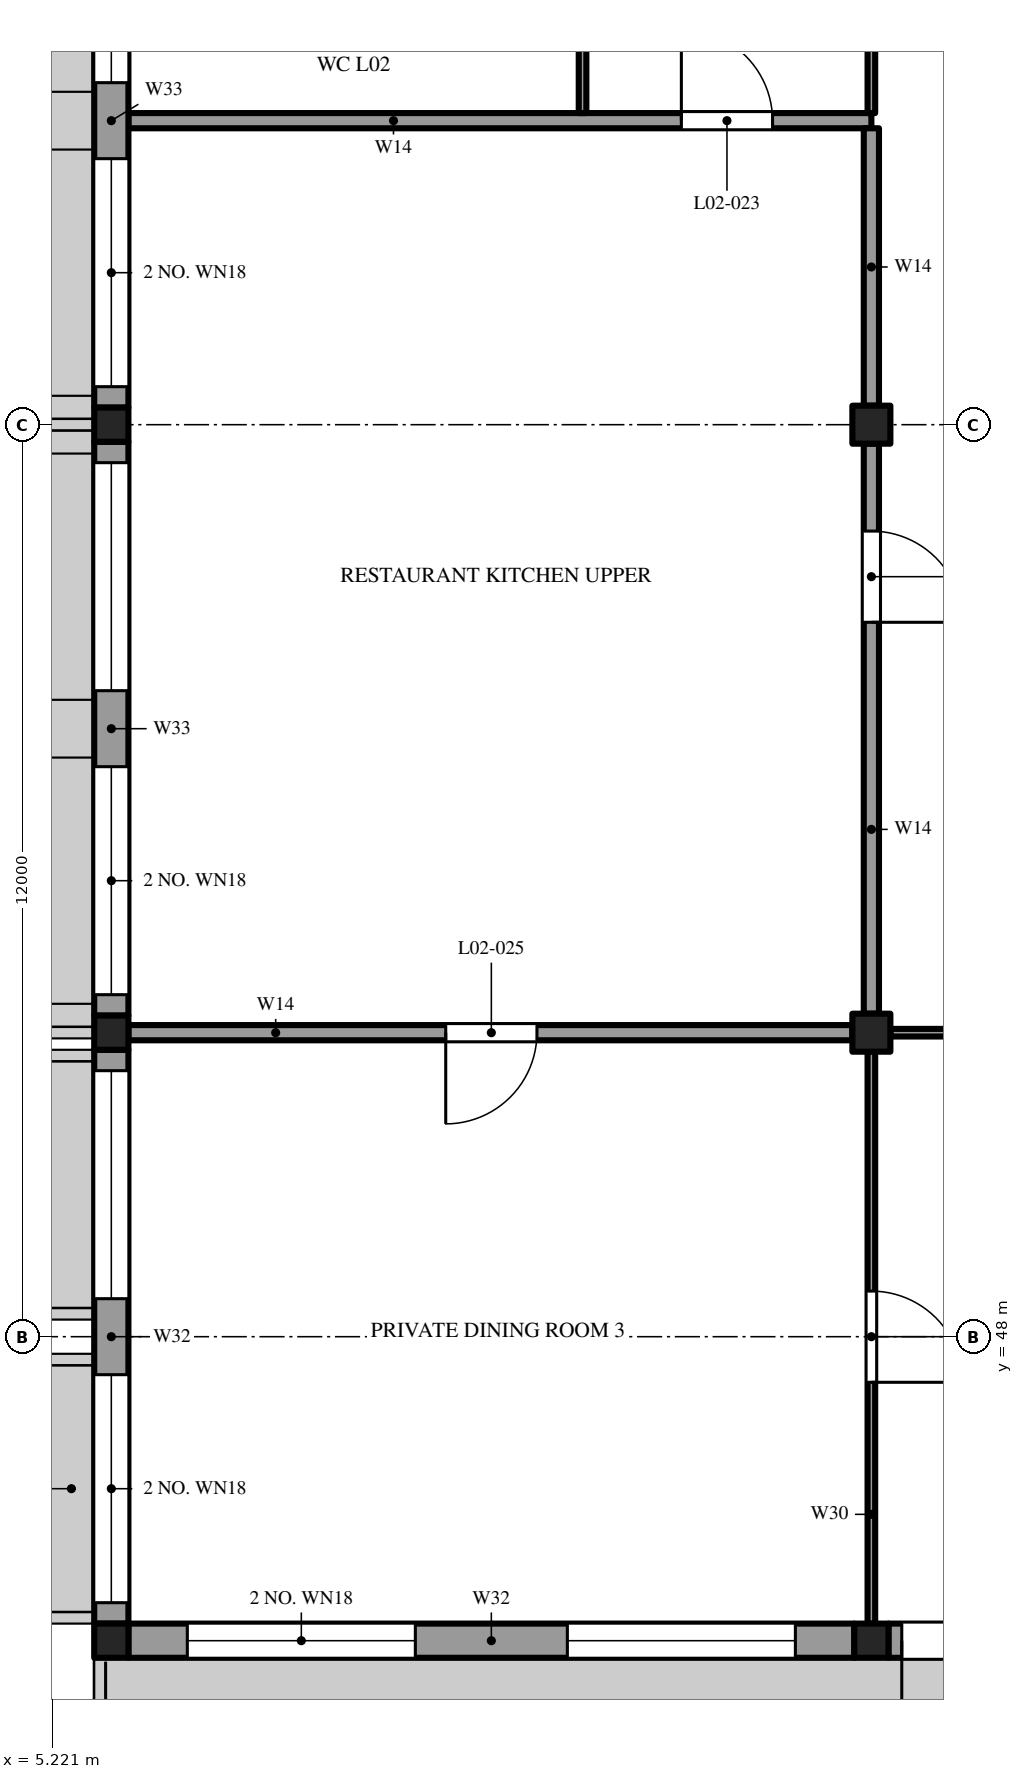
"""IFC4 building model, lengths in metres.
Left out: names, types, materials, properties, quantities, classifications, styles, units other than length and angle.
Written with IfcOpenShell. Run it as: python <this file> out.ifc"""

import sys

from ifc_helpers import new_model, si_unit, direction, frame, frame_2d, origin, origin_2d, place, context, subcontext, project, spatial, rectangle, extrude, element, fill, save


model = new_model("IFC4")
c1 = context("Model", 3, precision=1e-05, world=origin(), true_north=direction((0.0, 1.0)))
c2 = subcontext(c1, "Body", "Model", "MODEL_VIEW")
j1 = project(units=[si_unit("LENGTHUNIT", "METRE"), si_unit("PLANEANGLEUNIT", "RADIAN")], contexts=[c1])
p1 = place(None, origin())
s1 = spatial("IfcSite", under=j1, at=p1, CompositionType="ELEMENT")
p2 = place(p1, origin())
s2 = spatial("IfcBuilding", under=s1, at=p2, CompositionType="ELEMENT")
p3 = place(p2, frame((0.0, 0.0, 12.0)))
s3 = spatial("IfcBuildingStorey", under=s2, at=p3, CompositionType="ELEMENT", Elevation=12.0)
for number, where, z_axis, x_axis in (
    (1, (6.0, 44.0, 0.0), (0.0, 0.0, 1.0), (1.0, 0.0, 0.0)),
    (2, (6.0, 52.0, 0.0), (0.0, 0.0, 1.0), (1.0, 0.0, 0.0)),
    (3, (6.0, 60.0, 0.0), (0.0, 0.0, 1.0), (1.0, 0.0, 0.0)),
    (4, (16.0, 44.0, 0.0), (0.0, 0.0, 1.0), (1.0, 0.0, 0.0)),
):
    element("IfcColumn", number, at=place(p3, frame(where, z_axis=z_axis, x_axis=x_axis)), inside=s3, PredefinedType="COLUMN", context=c2, shape_type="SweptSolid", body=[
        extrude(rectangle(XDim=0.45, YDim=0.45, at=origin_2d()), origin(), (0.0, 0.0, 1.0), 4.8),
    ])
for number, where, z_axis, x_axis in (
    (5, (16.0, 52.0, 0.0), (0.0, 0.0, 1.0), (1.0, 0.0, 0.0)),
    (6, (16.0, 60.0, 0.0), (0.0, 0.0, 1.0), (1.0, 0.0, 0.0)),
):
    element("IfcColumn", number, at=place(p3, frame(where, z_axis=z_axis, x_axis=x_axis)), inside=s3, PredefinedType="COLUMN", context=c2, shape_type="SweptSolid", body=[
        extrude(rectangle(XDim=0.5, YDim=0.5, at=origin_2d()), origin(), (0.0, 0.0, 1.0), 4.8),
    ])
p4 = place(p3, frame((6.225, 44.0, 0.0), z_axis=(0.0, 0.0, 1.0), x_axis=(1.0, 0.0, 0.0)))
e7 = element("IfcWall", 7, at=p4, inside=s3, PredefinedType="SOLIDWALL", context=c2, shape_type="SweptSolid", body=[
    extrude(rectangle(XDim=9.55, YDim=0.45, at=frame_2d((4.775, 0.0))), origin(), (0.0, 0.0, 1.0), 4.45),
])
p5 = place(p4, frame((0.775, 0.0, 0.6)))
e8 = element("IfcOpeningElement", 8, at=p5, cuts=e7, PredefinedType="OPENING", context=c2, shape_type="SweptSolid", body=[
    extrude(rectangle(XDim=3.0, YDim=3.2, at=frame_2d((1.5, 1.6))), frame((0.0, 0.235, 0.0), z_axis=(0.0, -1.0, 0.0), x_axis=(1.0, 0.0, 0.0)), (0.0, 0.0, 1.0), 0.47),
])
p6 = place(p4, frame((5.775, 0.0, 0.6)))
e9 = element("IfcOpeningElement", 9, at=p6, cuts=e7, PredefinedType="OPENING", context=c2, shape_type="SweptSolid", body=[
    extrude(rectangle(XDim=3.0, YDim=3.2, at=frame_2d((1.5, 1.6))), frame((0.0, 0.235, 0.0), z_axis=(0.0, -1.0, 0.0), x_axis=(1.0, 0.0, 0.0)), (0.0, 0.0, 1.0), 0.47),
])
p7 = place(p3, frame((16.225, 44.0, 0.0), z_axis=(0.0, 0.0, 1.0), x_axis=(1.0, 0.0, 0.0)))
e10 = element("IfcWall", 10, at=p7, inside=s3, PredefinedType="SOLIDWALL", context=c2, shape_type="SweptSolid", body=[
    extrude(rectangle(XDim=9.55, YDim=0.45, at=frame_2d((4.775, 0.0))), origin(), (0.0, 0.0, 1.0), 4.45),
])
p8 = place(p7, frame((0.175, 0.0, 0.0)))
e11 = element("IfcOpeningElement", 11, at=p8, cuts=e10, PredefinedType="OPENING", context=c2, shape_type="SweptSolid", body=[
    extrude(rectangle(XDim=3.0, YDim=2.4, at=frame_2d((1.5, 1.2))), frame((0.0, 0.235, 0.0), z_axis=(0.0, -1.0, 0.0), x_axis=(1.0, 0.0, 0.0)), (0.0, 0.0, 1.0), 0.47),
])
p9 = place(p7, frame((3.475, 0.0, 0.0)))
e12 = element("IfcOpeningElement", 12, at=p9, cuts=e10, PredefinedType="OPENING", context=c2, shape_type="SweptSolid", body=[
    extrude(rectangle(XDim=3.0, YDim=2.4, at=frame_2d((1.5, 1.2))), frame((0.0, 0.235, 0.0), z_axis=(0.0, -1.0, 0.0), x_axis=(1.0, 0.0, 0.0)), (0.0, 0.0, 1.0), 0.47),
])
p10 = place(p3, frame((6.225, 52.0, 0.0), z_axis=(0.0, 0.0, 1.0), x_axis=(1.0, 0.0, 0.0)))
e13 = element("IfcWall", 13, at=p10, inside=s3, PredefinedType="SOLIDWALL", context=c2, shape_type="SweptSolid", body=[
    extrude(rectangle(XDim=9.525, YDim=0.2, at=frame_2d((4.762, 0.0))), origin(), (0.0, 0.0, 1.0), 4.45),
])
p11 = place(p10, frame((4.175, 0.0, 0.0)))
e14 = element("IfcOpeningElement", 14, at=p11, cuts=e13, PredefinedType="OPENING", context=c2, shape_type="SweptSolid", body=[
    extrude(rectangle(XDim=1.2, YDim=2.1, at=frame_2d((0.6, 1.05))), frame((0.0, 0.11, 0.0), z_axis=(0.0, -1.0, 0.0), x_axis=(1.0, 0.0, 0.0)), (0.0, 0.0, 1.0), 0.22),
])
p12 = place(p3, frame((16.25, 52.0, 0.0), z_axis=(0.0, 0.0, 1.0), x_axis=(1.0, 0.0, 0.0)))
e15 = element("IfcWall", 15, at=p12, inside=s3, PredefinedType="PARTITIONING", context=c2, shape_type="SweptSolid", body=[
    extrude(rectangle(XDim=9.5, YDim=0.1, at=frame_2d((4.75, 0.0))), origin(), (0.0, 0.0, 1.0), 4.45),
])
p13 = place(p12, frame((4.55, 0.0, 0.0)))
e16 = element("IfcOpeningElement", 16, at=p13, cuts=e15, PredefinedType="OPENING", context=c2, shape_type="SweptSolid", body=[
    extrude(rectangle(XDim=2.4, YDim=2.1, at=frame_2d((1.2, 1.05))), frame((0.0, 0.06, 0.0), z_axis=(0.0, -1.0, 0.0), x_axis=(1.0, 0.0, 0.0)), (0.0, 0.0, 1.0), 0.12),
])
p14 = place(p3, frame((6.225, 64.0, 0.0), z_axis=(0.0, 0.0, 1.0), x_axis=(1.0, 0.0, 0.0)))
e17 = element("IfcWall", 17, at=p14, inside=s3, PredefinedType="SOLIDWALL", context=c2, shape_type="SweptSolid", body=[
    extrude(rectangle(XDim=9.775, YDim=0.2, at=frame_2d((4.887, 0.0))), origin(), (0.0, 0.0, 1.0), 4.45),
])
p15 = place(p14, frame((7.275, 0.0, 0.0)))
e18 = element("IfcOpeningElement", 18, at=p15, cuts=e17, PredefinedType="OPENING", context=c2, shape_type="SweptSolid", body=[
    extrude(rectangle(XDim=1.2, YDim=2.1, at=frame_2d((0.6, 1.05))), frame((0.0, 0.11, 0.0), z_axis=(0.0, -1.0, 0.0), x_axis=(1.0, 0.0, 0.0)), (0.0, 0.0, 1.0), 0.22),
])
p16 = place(p3, frame((6.0, 51.775, 0.0), z_axis=(0.0, 0.0, 1.0), x_axis=(0.0, -1.0, 0.0)))
e19 = element("IfcWall", 19, at=p16, inside=s3, PredefinedType="SOLIDWALL", context=c2, shape_type="SweptSolid", body=[
    extrude(rectangle(XDim=7.55, YDim=0.45, at=frame_2d((3.775, 0.0))), origin(), (0.0, 0.0, 1.0), 4.45),
])
p17 = place(p16, frame((4.275, 0.0, 0.6)))
e20 = element("IfcOpeningElement", 20, at=p17, cuts=e19, PredefinedType="OPENING", context=c2, shape_type="SweptSolid", body=[
    extrude(rectangle(XDim=3.0, YDim=3.2, at=frame_2d((1.5, 1.6))), frame((0.0, 0.235, 0.0), z_axis=(0.0, -1.0, 0.0), x_axis=(1.0, 0.0, 0.0)), (0.0, 0.0, 1.0), 0.47),
])
p18 = place(p16, frame((0.275, 0.0, 0.6)))
e21 = element("IfcOpeningElement", 21, at=p18, cuts=e19, PredefinedType="OPENING", context=c2, shape_type="SweptSolid", body=[
    extrude(rectangle(XDim=3.0, YDim=3.2, at=frame_2d((1.5, 1.6))), frame((0.0, 0.235, 0.0), z_axis=(0.0, -1.0, 0.0), x_axis=(1.0, 0.0, 0.0)), (0.0, 0.0, 1.0), 0.47),
])
p19 = place(p3, frame((6.0, 59.775, 0.0), z_axis=(0.0, 0.0, 1.0), x_axis=(0.0, -1.0, 0.0)))
e22 = element("IfcWall", 22, at=p19, inside=s3, PredefinedType="SOLIDWALL", context=c2, shape_type="SweptSolid", body=[
    extrude(rectangle(XDim=7.55, YDim=0.45, at=frame_2d((3.775, 0.0))), origin(), (0.0, 0.0, 1.0), 4.45),
])
p20 = place(p19, frame((4.275, 0.0, 0.6)))
e23 = element("IfcOpeningElement", 23, at=p20, cuts=e22, PredefinedType="OPENING", context=c2, shape_type="SweptSolid", body=[
    extrude(rectangle(XDim=3.0, YDim=3.2, at=frame_2d((1.5, 1.6))), frame((0.0, 0.235, 0.0), z_axis=(0.0, -1.0, 0.0), x_axis=(1.0, 0.0, 0.0)), (0.0, 0.0, 1.0), 0.47),
])
p21 = place(p19, frame((0.275, 0.0, 0.6)))
e24 = element("IfcOpeningElement", 24, at=p21, cuts=e22, PredefinedType="OPENING", context=c2, shape_type="SweptSolid", body=[
    extrude(rectangle(XDim=3.0, YDim=3.2, at=frame_2d((1.5, 1.6))), frame((0.0, 0.235, 0.0), z_axis=(0.0, -1.0, 0.0), x_axis=(1.0, 0.0, 0.0)), (0.0, 0.0, 1.0), 0.47),
])
p22 = place(p3, frame((6.0, 67.775, 0.0), z_axis=(0.0, 0.0, 1.0), x_axis=(0.0, -1.0, 0.0)))
e25 = element("IfcWall", 25, at=p22, inside=s3, PredefinedType="SOLIDWALL", context=c2, shape_type="SweptSolid", body=[
    extrude(rectangle(XDim=7.55, YDim=0.45, at=frame_2d((3.775, 0.0))), origin(), (0.0, 0.0, 1.0), 4.45),
])
p23 = place(p22, frame((4.275, 0.0, 0.6)))
e26 = element("IfcOpeningElement", 26, at=p23, cuts=e25, PredefinedType="OPENING", context=c2, shape_type="SweptSolid", body=[
    extrude(rectangle(XDim=3.0, YDim=3.2, at=frame_2d((1.5, 1.6))), frame((0.0, 0.235, 0.0), z_axis=(0.0, -1.0, 0.0), x_axis=(1.0, 0.0, 0.0)), (0.0, 0.0, 1.0), 0.47),
])
p24 = place(p22, frame((0.275, 0.0, 0.6)))
e27 = element("IfcOpeningElement", 27, at=p24, cuts=e25, PredefinedType="OPENING", context=c2, shape_type="SweptSolid", body=[
    extrude(rectangle(XDim=3.0, YDim=3.2, at=frame_2d((1.5, 1.6))), frame((0.0, 0.235, 0.0), z_axis=(0.0, -1.0, 0.0), x_axis=(1.0, 0.0, 0.0)), (0.0, 0.0, 1.0), 0.47),
])
p25 = place(p3, frame((12.2, 64.1, 0.0), z_axis=(0.0, 0.0, 1.0), x_axis=(0.0, 1.0, 0.0)))
e28 = element("IfcWall", 28, at=p25, inside=s3, PredefinedType="PARTITIONING", context=c2, shape_type="SweptSolid", body=[
    extrude(rectangle(XDim=11.8, YDim=0.1, at=frame_2d((5.9, 0.0))), origin(), (0.0, 0.0, 1.0), 4.45),
])
p26 = place(p25, frame((1.35, 0.0, 0.0)))
e29 = element("IfcOpeningElement", 29, at=p26, cuts=e28, PredefinedType="OPENING", context=c2, shape_type="SweptSolid", body=[
    extrude(rectangle(XDim=1.1, YDim=2.1, at=frame_2d((0.55, 1.05))), frame((0.0, 0.06, 0.0), z_axis=(0.0, -1.0, 0.0), x_axis=(1.0, 0.0, 0.0)), (0.0, 0.0, 1.0), 0.12),
])
p27 = place(p25, frame((5.4, 0.0, 0.0)))
e30 = element("IfcOpeningElement", 30, at=p27, cuts=e28, PredefinedType="OPENING", context=c2, shape_type="SweptSolid", body=[
    extrude(rectangle(XDim=1.0, YDim=2.1, at=frame_2d((0.5, 1.05))), frame((0.0, 0.06, 0.0), z_axis=(0.0, -1.0, 0.0), x_axis=(1.0, 0.0, 0.0)), (0.0, 0.0, 1.0), 0.12),
])
p28 = place(p25, frame((9.4, 0.0, 0.0)))
e31 = element("IfcOpeningElement", 31, at=p28, cuts=e28, PredefinedType="OPENING", context=c2, shape_type="SweptSolid", body=[
    extrude(rectangle(XDim=1.0, YDim=2.1, at=frame_2d((0.5, 1.05))), frame((0.0, 0.06, 0.0), z_axis=(0.0, -1.0, 0.0), x_axis=(1.0, 0.0, 0.0)), (0.0, 0.0, 1.0), 0.12),
])
p29 = place(p3, frame((16.0, 44.225, 0.0), z_axis=(0.0, 0.0, 1.0), x_axis=(0.0, 1.0, 0.0)))
e32 = element("IfcWall", 32, at=p29, inside=s3, PredefinedType="PARTITIONING", context=c2, shape_type="SweptSolid", body=[
    extrude(rectangle(XDim=7.525, YDim=0.1, at=frame_2d((3.762, 0.0))), origin(), (0.0, 0.0, 1.0), 4.45),
])
p30 = place(p29, frame((3.175, 0.0, 0.0)))
e33 = element("IfcOpeningElement", 33, at=p30, cuts=e32, PredefinedType="OPENING", context=c2, shape_type="SweptSolid", body=[
    extrude(rectangle(XDim=1.2, YDim=2.1, at=frame_2d((0.6, 1.05))), frame((0.0, 0.06, 0.0), z_axis=(0.0, -1.0, 0.0), x_axis=(1.0, 0.0, 0.0)), (0.0, 0.0, 1.0), 0.12),
])
p31 = place(p3, frame((16.0, 52.25, 0.0), z_axis=(0.0, 0.0, 1.0), x_axis=(0.0, 1.0, 0.0)))
e34 = element("IfcWall", 34, at=p31, inside=s3, PredefinedType="SOLIDWALL", context=c2, shape_type="SweptSolid", body=[
    extrude(rectangle(XDim=7.5, YDim=0.2, at=frame_2d((3.75, 0.0))), origin(), (0.0, 0.0, 1.0), 4.45),
])
p32 = place(p31, frame((5.15, 0.0, 0.0)))
e35 = element("IfcOpeningElement", 35, at=p32, cuts=e34, PredefinedType="OPENING", context=c2, shape_type="SweptSolid", body=[
    extrude(rectangle(XDim=1.2, YDim=2.1, at=frame_2d((0.6, 1.05))), frame((0.0, 0.11, 0.0), z_axis=(0.0, -1.0, 0.0), x_axis=(1.0, 0.0, 0.0)), (0.0, 0.0, 1.0), 0.22),
])
p33 = place(p3, frame((16.0, 60.25, 0.0), z_axis=(0.0, 0.0, 1.0), x_axis=(0.0, 1.0, 0.0)))
e36 = element("IfcWall", 36, at=p33, inside=s3, PredefinedType="SOLIDWALL", context=c2, shape_type="SweptSolid", body=[
    extrude(rectangle(XDim=3.65, YDim=0.2, at=frame_2d((1.825, 0.0))), origin(), (0.0, 0.0, 1.0), 4.45),
])
p34 = place(p3, frame((16.0, 64.1, 0.0), z_axis=(0.0, 0.0, 1.0), x_axis=(0.0, 1.0, 0.0)))
e37 = element("IfcWall", 37, at=p34, inside=s3, PredefinedType="PARTITIONING", context=c2, shape_type="SweptSolid", body=[
    extrude(rectangle(XDim=3.65, YDim=0.1, at=frame_2d((1.825, 0.0))), origin(), (0.0, 0.0, 1.0), 4.45),
])
p35 = place(p15, origin())
e38 = element("IfcDoor", 38, at=p35, inside=s3, OperationType="SINGLE_SWING_RIGHT", PredefinedType="DOOR", context=c2, shape_type="SweptSolid", body=[
    extrude(rectangle(XDim=1.2, YDim=2.1, at=frame_2d((0.6, 1.05))), frame((0.0, 0.025, 0.0), z_axis=(0.0, -1.0, 0.0), x_axis=(1.0, 0.0, 0.0)), (0.0, 0.0, 1.0), 0.05),
])
fill(e18, e38)
p36 = place(p32, frame((1.2, 0.0, 0.0), z_axis=(0.0, 0.0, 1.0), x_axis=(-1.0, 0.0, 0.0)))
e39 = element("IfcDoor", 39, at=p36, inside=s3, OperationType="SINGLE_SWING_RIGHT", PredefinedType="DOOR", context=c2, shape_type="SweptSolid", body=[
    extrude(rectangle(XDim=1.2, YDim=2.1, at=frame_2d((0.6, 1.05))), frame((0.0, 0.025, 0.0), z_axis=(0.0, -1.0, 0.0), x_axis=(1.0, 0.0, 0.0)), (0.0, 0.0, 1.0), 0.05),
])
fill(e35, e39)
p37 = place(p11, frame((1.2, 0.0, 0.0), z_axis=(0.0, 0.0, 1.0), x_axis=(-1.0, 0.0, 0.0)))
e40 = element("IfcDoor", 40, at=p37, inside=s3, OperationType="SINGLE_SWING_LEFT", PredefinedType="DOOR", context=c2, shape_type="SweptSolid", body=[
    extrude(rectangle(XDim=1.2, YDim=2.1, at=frame_2d((0.6, 1.05))), frame((0.0, 0.025, 0.0), z_axis=(0.0, -1.0, 0.0), x_axis=(1.0, 0.0, 0.0)), (0.0, 0.0, 1.0), 0.05),
])
fill(e14, e40)
p38 = place(p30, frame((1.2, 0.0, 0.0), z_axis=(0.0, 0.0, 1.0), x_axis=(-1.0, 0.0, 0.0)))
e41 = element("IfcDoor", 41, at=p38, inside=s3, OperationType="SINGLE_SWING_RIGHT", PredefinedType="DOOR", context=c2, shape_type="SweptSolid", body=[
    extrude(rectangle(XDim=1.2, YDim=2.1, at=frame_2d((0.6, 1.05))), frame((0.0, 0.025, 0.0), z_axis=(0.0, -1.0, 0.0), x_axis=(1.0, 0.0, 0.0)), (0.0, 0.0, 1.0), 0.05),
])
fill(e33, e41)
p39 = place(p8, frame((3.0, 0.0, 0.0), z_axis=(0.0, 0.0, 1.0), x_axis=(-1.0, 0.0, 0.0)))
e42 = element("IfcDoor", 42, at=p39, inside=s3, OperationType="DOUBLE_DOOR_SINGLE_SWING", PredefinedType="DOOR", context=c2, shape_type="SweptSolid", body=[
    extrude(rectangle(XDim=3.0, YDim=2.4, at=frame_2d((1.5, 1.2))), frame((0.0, 0.025, 0.0), z_axis=(0.0, -1.0, 0.0), x_axis=(1.0, 0.0, 0.0)), (0.0, 0.0, 1.0), 0.05),
])
fill(e11, e42)
p40 = place(p5, origin())
e43 = element("IfcWindow", 43, at=p40, inside=s3, PartitioningType="SINGLE_PANEL", PredefinedType="WINDOW", context=c2, shape_type="SweptSolid", body=[
    extrude(rectangle(XDim=3.0, YDim=3.2, at=frame_2d((1.5, 1.6))), frame((0.0, 0.215, 0.0), z_axis=(0.0, -1.0, 0.0), x_axis=(1.0, 0.0, 0.0)), (0.0, 0.0, 1.0), 0.06),
])
fill(e8, e43)
p41 = place(p6, origin())
e44 = element("IfcWindow", 44, at=p41, inside=s3, PartitioningType="SINGLE_PANEL", PredefinedType="WINDOW", context=c2, shape_type="SweptSolid", body=[
    extrude(rectangle(XDim=3.0, YDim=3.2, at=frame_2d((1.5, 1.6))), frame((0.0, 0.215, 0.0), z_axis=(0.0, -1.0, 0.0), x_axis=(1.0, 0.0, 0.0)), (0.0, 0.0, 1.0), 0.06),
])
fill(e9, e44)
p42 = place(p17, origin())
e45 = element("IfcWindow", 45, at=p42, inside=s3, PartitioningType="SINGLE_PANEL", PredefinedType="WINDOW", context=c2, shape_type="SweptSolid", body=[
    extrude(rectangle(XDim=3.0, YDim=3.2, at=frame_2d((1.5, 1.6))), frame((0.0, 0.215, 0.0), z_axis=(0.0, -1.0, 0.0), x_axis=(1.0, 0.0, 0.0)), (0.0, 0.0, 1.0), 0.06),
])
fill(e20, e45)
p43 = place(p18, origin())
e46 = element("IfcWindow", 46, at=p43, inside=s3, PartitioningType="SINGLE_PANEL", PredefinedType="WINDOW", context=c2, shape_type="SweptSolid", body=[
    extrude(rectangle(XDim=3.0, YDim=3.2, at=frame_2d((1.5, 1.6))), frame((0.0, 0.215, 0.0), z_axis=(0.0, -1.0, 0.0), x_axis=(1.0, 0.0, 0.0)), (0.0, 0.0, 1.0), 0.06),
])
fill(e21, e46)
p44 = place(p20, origin())
e47 = element("IfcWindow", 47, at=p44, inside=s3, PartitioningType="SINGLE_PANEL", PredefinedType="WINDOW", context=c2, shape_type="SweptSolid", body=[
    extrude(rectangle(XDim=3.0, YDim=3.2, at=frame_2d((1.5, 1.6))), frame((0.0, 0.215, 0.0), z_axis=(0.0, -1.0, 0.0), x_axis=(1.0, 0.0, 0.0)), (0.0, 0.0, 1.0), 0.06),
])
fill(e23, e47)
p45 = place(p21, origin())
e48 = element("IfcWindow", 48, at=p45, inside=s3, PartitioningType="SINGLE_PANEL", PredefinedType="WINDOW", context=c2, shape_type="SweptSolid", body=[
    extrude(rectangle(XDim=3.0, YDim=3.2, at=frame_2d((1.5, 1.6))), frame((0.0, 0.215, 0.0), z_axis=(0.0, -1.0, 0.0), x_axis=(1.0, 0.0, 0.0)), (0.0, 0.0, 1.0), 0.06),
])
fill(e24, e48)
p46 = place(p23, origin())
e49 = element("IfcWindow", 49, at=p46, inside=s3, PartitioningType="SINGLE_PANEL", PredefinedType="WINDOW", context=c2, shape_type="SweptSolid", body=[
    extrude(rectangle(XDim=3.0, YDim=3.2, at=frame_2d((1.5, 1.6))), frame((0.0, 0.215, 0.0), z_axis=(0.0, -1.0, 0.0), x_axis=(1.0, 0.0, 0.0)), (0.0, 0.0, 1.0), 0.06),
])
fill(e26, e49)
p47 = place(p24, origin())
e50 = element("IfcWindow", 50, at=p47, inside=s3, PartitioningType="SINGLE_PANEL", PredefinedType="WINDOW", context=c2, shape_type="SweptSolid", body=[
    extrude(rectangle(XDim=3.0, YDim=3.2, at=frame_2d((1.5, 1.6))), frame((0.0, 0.215, 0.0), z_axis=(0.0, -1.0, 0.0), x_axis=(1.0, 0.0, 0.0)), (0.0, 0.0, 1.0), 0.06),
])
fill(e27, e50)
save(model, sys.argv[1])
